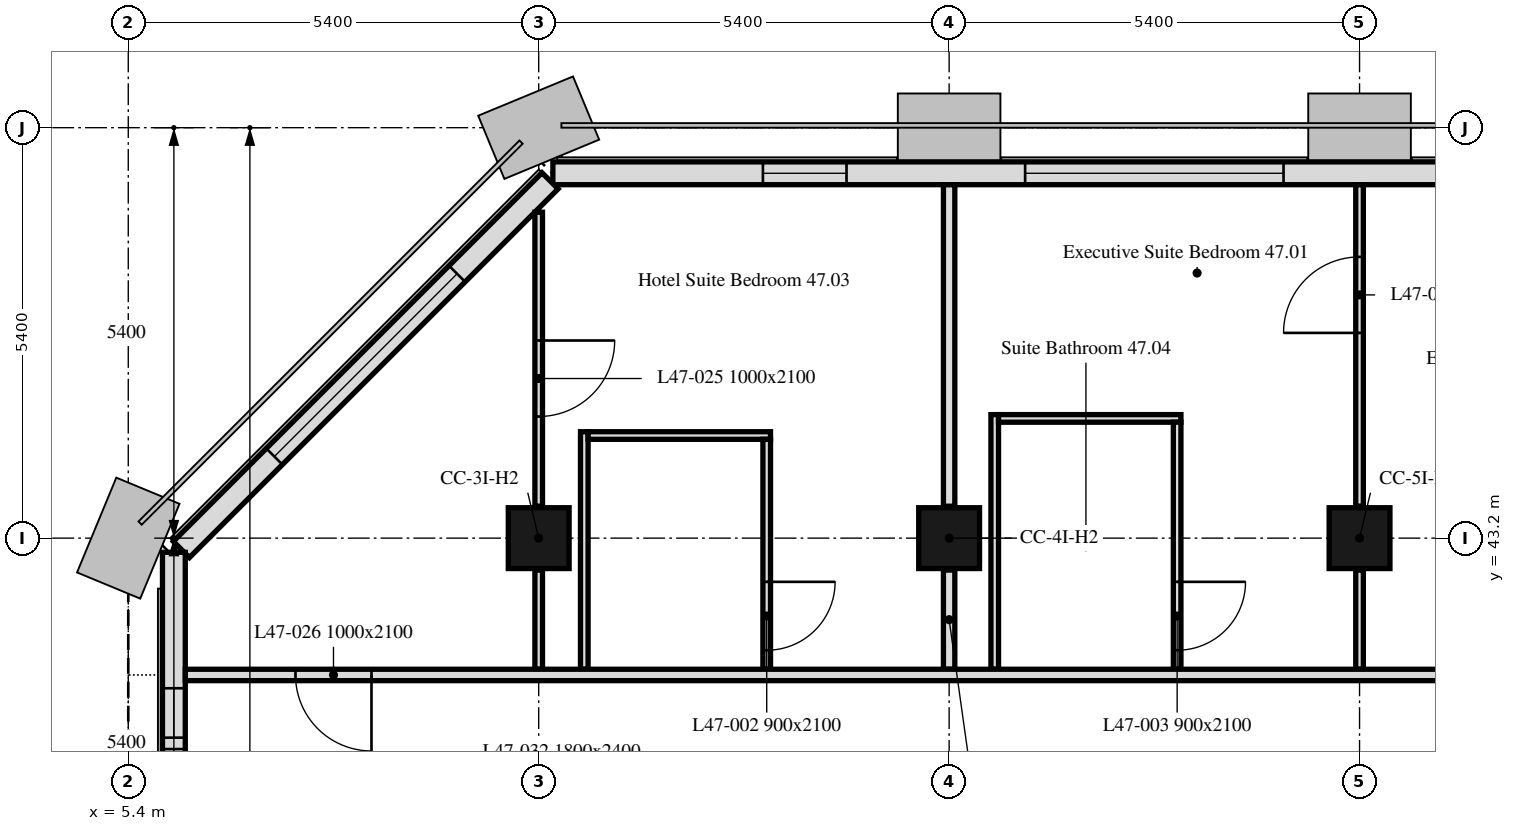
"""IFC4 building model, lengths in metres.
Left out: names, types, materials, properties, quantities, classifications, styles, units other than length and angle.
Written with IfcOpenShell. Run it as: python <this file> out.ifc"""

import sys

from ifc_helpers import new_model, si_unit, direction, frame, frame_2d, origin, origin_2d, place, context, subcontext, project, spatial, rectangle, extrude, element, fill, save


model = new_model("IFC4")
c1 = context("Model", 3, precision=1e-05, world=origin(), true_north=direction((0.0, 1.0)))
c2 = subcontext(c1, "Body", "Model", "MODEL_VIEW")
j1 = project(units=[si_unit("LENGTHUNIT", "METRE"), si_unit("PLANEANGLEUNIT", "RADIAN")], contexts=[c1])
p1 = place(None, origin())
s1 = spatial("IfcSite", under=j1, at=p1, CompositionType="ELEMENT")
p2 = place(p1, origin())
s2 = spatial("IfcBuilding", under=s1, at=p2, CompositionType="ELEMENT")
p3 = place(p2, frame((0.0, 0.0, 193.9)))
s3 = spatial("IfcBuildingStorey", under=s2, at=p3, CompositionType="ELEMENT", Elevation=193.9)
for number, where, z_axis, x_axis in (
    (1, (10.8, 43.2, 0.0), (0.0, 0.0, 1.0), (1.0, 0.0, 0.0)),
    (2, (16.2, 43.2, 0.0), (0.0, 0.0, 1.0), (1.0, 0.0, 0.0)),
    (3, (21.6, 43.2, 0.0), (0.0, 0.0, 1.0), (1.0, 0.0, 0.0)),
):
    element("IfcColumn", number, at=place(p3, frame(where, z_axis=z_axis, x_axis=x_axis)), inside=s3, PredefinedType="COLUMN", context=c2, shape_type="SweptSolid", body=[
        extrude(rectangle(XDim=0.8, YDim=0.8, at=origin_2d()), origin(), (0.0, 0.0, 1.0), 3.0),
    ])
p4 = place(p3, frame((43.014, 48.0, 0.0), z_axis=(0.0, 0.0, 1.0), x_axis=(-1.0, 0.0, 0.0)))
e4 = element("IfcWall", 4, at=p4, inside=s3, PredefinedType="SOLIDWALL", context=c2, shape_type="SweptSolid", body=[
    extrude(rectangle(XDim=32.027, YDim=0.3, at=frame_2d((16.014, 0.0))), origin(), (0.0, 0.0, 1.0), 3.0),
])
p5 = place(p4, frame((0.814, 0.0, 0.9)))
e5 = element("IfcOpeningElement", 5, at=p5, cuts=e4, PredefinedType="OPENING", context=c2, shape_type="SweptSolid", body=[
    extrude(rectangle(XDim=3.4, YDim=1.7, at=frame_2d((1.7, 0.85))), frame((0.0, 0.16, 0.0), z_axis=(0.0, -1.0, 0.0), x_axis=(1.0, 0.0, 0.0)), (0.0, 0.0, 1.0), 0.32),
])
p6 = place(p4, frame((6.564, 0.0, 0.9)))
e6 = element("IfcOpeningElement", 6, at=p6, cuts=e4, PredefinedType="OPENING", context=c2, shape_type="SweptSolid", body=[
    extrude(rectangle(XDim=1.1, YDim=1.7, at=frame_2d((0.55, 0.85))), frame((0.0, 0.16, 0.0), z_axis=(0.0, -1.0, 0.0), x_axis=(1.0, 0.0, 0.0)), (0.0, 0.0, 1.0), 0.32),
])
p7 = place(p4, frame((11.614, 0.0, 0.9)))
e7 = element("IfcOpeningElement", 7, at=p7, cuts=e4, PredefinedType="OPENING", context=c2, shape_type="SweptSolid", body=[
    extrude(rectangle(XDim=3.4, YDim=1.7, at=frame_2d((1.7, 0.85))), frame((0.0, 0.16, 0.0), z_axis=(0.0, -1.0, 0.0), x_axis=(1.0, 0.0, 0.0)), (0.0, 0.0, 1.0), 0.32),
])
p8 = place(p4, frame((17.364, 0.0, 0.9)))
e8 = element("IfcOpeningElement", 8, at=p8, cuts=e4, PredefinedType="OPENING", context=c2, shape_type="SweptSolid", body=[
    extrude(rectangle(XDim=1.1, YDim=1.7, at=frame_2d((0.55, 0.85))), frame((0.0, 0.16, 0.0), z_axis=(0.0, -1.0, 0.0), x_axis=(1.0, 0.0, 0.0)), (0.0, 0.0, 1.0), 0.32),
])
p9 = place(p4, frame((22.414, 0.0, 0.9)))
e9 = element("IfcOpeningElement", 9, at=p9, cuts=e4, PredefinedType="OPENING", context=c2, shape_type="SweptSolid", body=[
    extrude(rectangle(XDim=3.4, YDim=1.7, at=frame_2d((1.7, 0.85))), frame((0.0, 0.16, 0.0), z_axis=(0.0, -1.0, 0.0), x_axis=(1.0, 0.0, 0.0)), (0.0, 0.0, 1.0), 0.32),
])
p10 = place(p4, frame((28.164, 0.0, 0.9)))
e10 = element("IfcOpeningElement", 10, at=p10, cuts=e4, PredefinedType="OPENING", context=c2, shape_type="SweptSolid", body=[
    extrude(rectangle(XDim=1.1, YDim=1.7, at=frame_2d((0.55, 0.85))), frame((0.0, 0.16, 0.0), z_axis=(0.0, -1.0, 0.0), x_axis=(1.0, 0.0, 0.0)), (0.0, 0.0, 1.0), 0.32),
])
p11 = place(p3, frame((10.949, 47.901, 0.0), z_axis=(0.0, 0.0, 1.0), x_axis=(-0.707106781187, -0.707106781187, 0.0)))
e11 = element("IfcWall", 11, at=p11, inside=s3, PredefinedType="SOLIDWALL", context=c2, shape_type="SweptSolid", body=[
    extrude(rectangle(XDim=6.86, YDim=0.3, at=frame_2d((3.43, 0.0))), origin(), (0.0, 0.0, 1.0), 3.0),
])
p12 = place(p11, frame((1.73, 0.0, 0.9)))
e12 = element("IfcOpeningElement", 12, at=p12, cuts=e11, PredefinedType="OPENING", context=c2, shape_type="SweptSolid", body=[
    extrude(rectangle(XDim=3.4, YDim=1.7, at=frame_2d((1.7, 0.85))), frame((0.0, 0.16, 0.0), z_axis=(0.0, -1.0, 0.0), x_axis=(1.0, 0.0, 0.0)), (0.0, 0.0, 1.0), 0.32),
])
p13 = place(p3, frame((6.0, 43.014, 0.0), z_axis=(0.0, 0.0, 1.0), x_axis=(0.0, -1.0, 0.0)))
e13 = element("IfcWall", 13, at=p13, inside=s3, PredefinedType="SOLIDWALL", context=c2, shape_type="SweptSolid", body=[
    extrude(rectangle(XDim=10.614, YDim=0.3, at=frame_2d((5.307, 0.0))), origin(), (0.0, 0.0, 1.0), 3.0),
])
p14 = place(p13, frame((1.789, 0.0, 0.9)))
e14 = element("IfcOpeningElement", 14, at=p14, cuts=e13, PredefinedType="OPENING", context=c2, shape_type="SweptSolid", body=[
    extrude(rectangle(XDim=0.65, YDim=1.7, at=frame_2d((0.325, 0.85))), frame((0.0, 0.16, 0.0), z_axis=(0.0, -1.0, 0.0), x_axis=(1.0, 0.0, 0.0)), (0.0, 0.0, 1.0), 0.32),
])
p15 = place(p13, frame((2.589, 0.0, 0.9)))
e15 = element("IfcOpeningElement", 15, at=p15, cuts=e13, PredefinedType="OPENING", context=c2, shape_type="SweptSolid", body=[
    extrude(rectangle(XDim=0.65, YDim=1.7, at=frame_2d((0.325, 0.85))), frame((0.0, 0.16, 0.0), z_axis=(0.0, -1.0, 0.0), x_axis=(1.0, 0.0, 0.0)), (0.0, 0.0, 1.0), 0.32),
])
p16 = place(p13, frame((6.564, 0.0, 0.9)))
e16 = element("IfcOpeningElement", 16, at=p16, cuts=e13, PredefinedType="OPENING", context=c2, shape_type="SweptSolid", body=[
    extrude(rectangle(XDim=1.1, YDim=1.7, at=frame_2d((0.55, 0.85))), frame((0.0, 0.16, 0.0), z_axis=(0.0, -1.0, 0.0), x_axis=(1.0, 0.0, 0.0)), (0.0, 0.0, 1.0), 0.32),
])
p17 = place(p13, frame((8.164, 0.0, 0.9)))
e17 = element("IfcOpeningElement", 17, at=p17, cuts=e13, PredefinedType="OPENING", context=c2, shape_type="SweptSolid", body=[
    extrude(rectangle(XDim=1.1, YDim=1.7, at=frame_2d((0.55, 0.85))), frame((0.0, 0.16, 0.0), z_axis=(0.0, -1.0, 0.0), x_axis=(1.0, 0.0, 0.0)), (0.0, 0.0, 1.0), 0.32),
])
p18 = place(p3, frame((10.8, 47.488, 0.0), z_axis=(0.0, 0.0, 1.0), x_axis=(0.0, -1.0, 0.0)))
e18 = element("IfcWall", 18, at=p18, inside=s3, PredefinedType="PARTITIONING", context=c2, shape_type="SweptSolid", body=[
    extrude(rectangle(XDim=3.868, YDim=0.1, at=frame_2d((1.934, 0.0))), origin(), (0.0, 0.0, 1.0), 3.0),
])
p19 = place(p18, frame((1.688, 0.0, 0.0)))
e19 = element("IfcOpeningElement", 19, at=p19, cuts=e18, PredefinedType="OPENING", context=c2, shape_type="SweptSolid", body=[
    extrude(rectangle(XDim=1.0, YDim=2.1, at=frame_2d((0.5, 1.05))), frame((0.0, 0.05, 0.0), z_axis=(0.0, -1.0, 0.0), x_axis=(1.0, 0.0, 0.0)), (0.0, 0.0, 1.0), 0.1),
])
p20 = place(p3, frame((10.8, 42.78, 0.0), z_axis=(0.0, 0.0, 1.0), x_axis=(0.0, -1.0, 0.0)))
e20 = element("IfcWall", 20, at=p20, inside=s3, PredefinedType="PARTITIONING", context=c2, shape_type="SweptSolid", body=[
    extrude(rectangle(XDim=1.305, YDim=0.1, at=frame_2d((0.652, 0.0))), origin(), (0.0, 0.0, 1.0), 3.0),
])
p21 = place(p3, frame((11.4, 41.475, 0.0), z_axis=(0.0, 0.0, 1.0), x_axis=(0.0, 1.0, 0.0)))
e21 = element("IfcWall", 21, at=p21, inside=s3, PredefinedType="PARTITIONING", context=c2, shape_type="SweptSolid", body=[
    extrude(rectangle(XDim=3.125, YDim=0.1, at=frame_2d((1.562, 0.0))), origin(), (0.0, 0.0, 1.0), 3.0),
])
p22 = place(p3, frame((11.45, 44.55, 0.0), z_axis=(0.0, 0.0, 1.0), x_axis=(1.0, 0.0, 0.0)))
e22 = element("IfcWall", 22, at=p22, inside=s3, PredefinedType="PARTITIONING", context=c2, shape_type="SweptSolid", body=[
    extrude(rectangle(XDim=2.4, YDim=0.1, at=frame_2d((1.2, 0.0))), origin(), (0.0, 0.0, 1.0), 3.0),
])
p23 = place(p3, frame((13.8, 44.5, 0.0), z_axis=(0.0, 0.0, 1.0), x_axis=(0.0, -1.0, 0.0)))
e23 = element("IfcWall", 23, at=p23, inside=s3, PredefinedType="PARTITIONING", context=c2, shape_type="SweptSolid", body=[
    extrude(rectangle(XDim=3.025, YDim=0.1, at=frame_2d((1.512, 0.0))), origin(), (0.0, 0.0, 1.0), 3.0),
])
p24 = place(p23, frame((1.875, 0.0, 0.0)))
e24 = element("IfcOpeningElement", 24, at=p24, cuts=e23, PredefinedType="OPENING", context=c2, shape_type="SweptSolid", body=[
    extrude(rectangle(XDim=0.9, YDim=2.1, at=frame_2d((0.45, 1.05))), frame((0.0, 0.05, 0.0), z_axis=(0.0, -1.0, 0.0), x_axis=(1.0, 0.0, 0.0)), (0.0, 0.0, 1.0), 0.1),
])
p25 = place(p3, frame((16.2, 41.475, 0.0), z_axis=(0.0, 0.0, 1.0), x_axis=(0.0, 1.0, 0.0)))
e25 = element("IfcWall", 25, at=p25, inside=s3, PredefinedType="PARTITIONING", context=c2, shape_type="SweptSolid", body=[
    extrude(rectangle(XDim=1.305, YDim=0.15, at=frame_2d((0.652, 0.0))), origin(), (0.0, 0.0, 1.0), 2.4),
])
p26 = place(p3, frame((16.2, 43.62, 0.0), z_axis=(0.0, 0.0, 1.0), x_axis=(0.0, 1.0, 0.0)))
e26 = element("IfcWall", 26, at=p26, inside=s3, PredefinedType="PARTITIONING", context=c2, shape_type="SweptSolid", body=[
    extrude(rectangle(XDim=4.229, YDim=0.15, at=frame_2d((2.115, 0.0))), origin(), (0.0, 0.0, 1.0), 2.4),
])
p27 = place(p3, frame((16.8, 41.475, 0.0), z_axis=(0.0, 0.0, 1.0), x_axis=(0.0, 1.0, 0.0)))
e27 = element("IfcWall", 27, at=p27, inside=s3, PredefinedType="PARTITIONING", context=c2, shape_type="SweptSolid", body=[
    extrude(rectangle(XDim=3.35, YDim=0.1, at=frame_2d((1.675, 0.0))), origin(), (0.0, 0.0, 1.0), 3.0),
])
p28 = place(p3, frame((16.85, 44.775, 0.0), z_axis=(0.0, 0.0, 1.0), x_axis=(1.0, 0.0, 0.0)))
e28 = element("IfcWall", 28, at=p28, inside=s3, PredefinedType="PARTITIONING", context=c2, shape_type="SweptSolid", body=[
    extrude(rectangle(XDim=2.4, YDim=0.1, at=frame_2d((1.2, 0.0))), origin(), (0.0, 0.0, 1.0), 3.0),
])
p29 = place(p3, frame((19.2, 44.725, 0.0), z_axis=(0.0, 0.0, 1.0), x_axis=(0.0, -1.0, 0.0)))
e29 = element("IfcWall", 29, at=p29, inside=s3, PredefinedType="PARTITIONING", context=c2, shape_type="SweptSolid", body=[
    extrude(rectangle(XDim=3.25, YDim=0.1, at=frame_2d((1.625, 0.0))), origin(), (0.0, 0.0, 1.0), 3.0),
])
p30 = place(p29, frame((2.1, 0.0, 0.0)))
e30 = element("IfcOpeningElement", 30, at=p30, cuts=e29, PredefinedType="OPENING", context=c2, shape_type="SweptSolid", body=[
    extrude(rectangle(XDim=0.9, YDim=2.1, at=frame_2d((0.45, 1.05))), frame((0.0, 0.05, 0.0), z_axis=(0.0, -1.0, 0.0), x_axis=(1.0, 0.0, 0.0)), (0.0, 0.0, 1.0), 0.1),
])
p31 = place(p3, frame((21.6, 41.475, 0.0), z_axis=(0.0, 0.0, 1.0), x_axis=(0.0, 1.0, 0.0)))
e31 = element("IfcWall", 31, at=p31, inside=s3, PredefinedType="PARTITIONING", context=c2, shape_type="SweptSolid", body=[
    extrude(rectangle(XDim=1.305, YDim=0.1, at=frame_2d((0.652, 0.0))), origin(), (0.0, 0.0, 1.0), 2.4),
])
p32 = place(p3, frame((21.6, 43.62, 0.0), z_axis=(0.0, 0.0, 1.0), x_axis=(0.0, 1.0, 0.0)))
e32 = element("IfcWall", 32, at=p32, inside=s3, PredefinedType="PARTITIONING", context=c2, shape_type="SweptSolid", body=[
    extrude(rectangle(XDim=4.229, YDim=0.1, at=frame_2d((2.115, 0.0))), origin(), (0.0, 0.0, 1.0), 2.4),
])
p33 = place(p32, frame((2.28, 0.0, 0.0)))
e33 = element("IfcOpeningElement", 33, at=p33, cuts=e32, PredefinedType="OPENING", context=c2, shape_type="SweptSolid", body=[
    extrude(rectangle(XDim=1.0, YDim=2.1, at=frame_2d((0.5, 1.05))), frame((0.0, 0.05, 0.0), z_axis=(0.0, -1.0, 0.0), x_axis=(1.0, 0.0, 0.0)), (0.0, 0.0, 1.0), 0.1),
])
p34 = place(p3, frame((47.849, 41.4, 0.0), z_axis=(0.0, 0.0, 1.0), x_axis=(-1.0, 0.0, 0.0)))
e34 = element("IfcWall", 34, at=p34, inside=s3, PredefinedType="PARTITIONING", context=c2, shape_type="SweptSolid", body=[
    extrude(rectangle(XDim=41.698, YDim=0.15, at=frame_2d((20.849, 0.0))), origin(), (0.0, 0.0, 1.0), 2.4),
])
p35 = place(p34, frame((39.249, 0.0, 0.0)))
e35 = element("IfcOpeningElement", 35, at=p35, cuts=e34, PredefinedType="OPENING", context=c2, shape_type="SweptSolid", body=[
    extrude(rectangle(XDim=1.0, YDim=2.1, at=frame_2d((0.5, 1.05))), frame((0.0, 0.075, 0.0), z_axis=(0.0, -1.0, 0.0), x_axis=(1.0, 0.0, 0.0)), (0.0, 0.0, 1.0), 0.15),
])
p36 = place(p34, frame((11.449, 0.0, 0.0)))
e36 = element("IfcOpeningElement", 36, at=p36, cuts=e34, PredefinedType="OPENING", context=c2, shape_type="SweptSolid", body=[
    extrude(rectangle(XDim=1.0, YDim=2.1, at=frame_2d((0.5, 1.05))), frame((0.0, 0.075, 0.0), z_axis=(0.0, -1.0, 0.0), x_axis=(1.0, 0.0, 0.0)), (0.0, 0.0, 1.0), 0.15),
])
p37 = place(p34, frame((3.099, 0.0, 0.0)))
e37 = element("IfcOpeningElement", 37, at=p37, cuts=e34, PredefinedType="OPENING", context=c2, shape_type="SweptSolid", body=[
    extrude(rectangle(XDim=1.0, YDim=2.1, at=frame_2d((0.5, 1.05))), frame((0.0, 0.075, 0.0), z_axis=(0.0, -1.0, 0.0), x_axis=(1.0, 0.0, 0.0)), (0.0, 0.0, 1.0), 0.15),
])
p38 = place(p34, frame((23.049, 0.0, 0.0)))
e38 = element("IfcOpeningElement", 38, at=p38, cuts=e34, PredefinedType="OPENING", context=c2, shape_type="SweptSolid", body=[
    extrude(rectangle(XDim=1.0, YDim=2.1, at=frame_2d((0.5, 1.05))), frame((0.0, 0.075, 0.0), z_axis=(0.0, -1.0, 0.0), x_axis=(1.0, 0.0, 0.0)), (0.0, 0.0, 1.0), 0.15),
])
p39 = place(p9, origin())
e39 = element("IfcWindow", 39, at=p39, inside=s3, PartitioningType="SINGLE_PANEL", PredefinedType="WINDOW", context=c2, shape_type="SweptSolid", body=[
    extrude(rectangle(XDim=3.4, YDim=1.7, at=frame_2d((1.7, 0.85))), frame((0.0, 0.03, 0.0), z_axis=(0.0, -1.0, 0.0), x_axis=(1.0, 0.0, 0.0)), (0.0, 0.0, 1.0), 0.06),
])
fill(e9, e39)
p40 = place(p10, origin())
e40 = element("IfcWindow", 40, at=p40, inside=s3, PartitioningType="SINGLE_PANEL", PredefinedType="WINDOW", context=c2, shape_type="SweptSolid", body=[
    extrude(rectangle(XDim=1.1, YDim=1.7, at=frame_2d((0.55, 0.85))), frame((0.0, 0.03, 0.0), z_axis=(0.0, -1.0, 0.0), x_axis=(1.0, 0.0, 0.0)), (0.0, 0.0, 1.0), 0.06),
])
fill(e10, e40)
p41 = place(p12, origin())
e41 = element("IfcWindow", 41, at=p41, inside=s3, PartitioningType="SINGLE_PANEL", PredefinedType="WINDOW", context=c2, shape_type="SweptSolid", body=[
    extrude(rectangle(XDim=3.4, YDim=1.7, at=frame_2d((1.7, 0.85))), frame((0.0, 0.03, 0.0), z_axis=(0.0, -1.0, 0.0), x_axis=(1.0, 0.0, 0.0)), (0.0, 0.0, 1.0), 0.06),
])
fill(e12, e41)
p42 = place(p14, origin())
e42 = element("IfcWindow", 42, at=p42, inside=s3, PartitioningType="SINGLE_PANEL", PredefinedType="WINDOW", context=c2, shape_type="SweptSolid", body=[
    extrude(rectangle(XDim=0.65, YDim=1.7, at=frame_2d((0.325, 0.85))), frame((0.0, 0.03, 0.0), z_axis=(0.0, -1.0, 0.0), x_axis=(1.0, 0.0, 0.0)), (0.0, 0.0, 1.0), 0.06),
])
fill(e14, e42)
p43 = place(p15, origin())
e43 = element("IfcWindow", 43, at=p43, inside=s3, PartitioningType="SINGLE_PANEL", PredefinedType="WINDOW", context=c2, shape_type="SweptSolid", body=[
    extrude(rectangle(XDim=0.65, YDim=1.7, at=frame_2d((0.325, 0.85))), frame((0.0, 0.03, 0.0), z_axis=(0.0, -1.0, 0.0), x_axis=(1.0, 0.0, 0.0)), (0.0, 0.0, 1.0), 0.06),
])
fill(e15, e43)
p44 = place(p24, origin())
e44 = element("IfcDoor", 44, at=p44, inside=s3, OperationType="SINGLE_SWING_RIGHT", PredefinedType="DOOR", context=c2, shape_type="SweptSolid", body=[
    extrude(rectangle(XDim=0.9, YDim=2.1, at=frame_2d((0.45, 1.05))), frame((0.0, 0.025, 0.0), z_axis=(0.0, -1.0, 0.0), x_axis=(1.0, 0.0, 0.0)), (0.0, 0.0, 1.0), 0.05),
])
fill(e24, e44)
p45 = place(p30, origin())
e45 = element("IfcDoor", 45, at=p45, inside=s3, OperationType="SINGLE_SWING_RIGHT", PredefinedType="DOOR", context=c2, shape_type="SweptSolid", body=[
    extrude(rectangle(XDim=0.9, YDim=2.1, at=frame_2d((0.45, 1.05))), frame((0.0, 0.025, 0.0), z_axis=(0.0, -1.0, 0.0), x_axis=(1.0, 0.0, 0.0)), (0.0, 0.0, 1.0), 0.05),
])
fill(e30, e45)
p46 = place(p19, origin())
e46 = element("IfcDoor", 46, at=p46, inside=s3, OperationType="SINGLE_SWING_RIGHT", PredefinedType="DOOR", context=c2, shape_type="SweptSolid", body=[
    extrude(rectangle(XDim=1.0, YDim=2.1, at=frame_2d((0.5, 1.05))), frame((0.0, 0.025, 0.0), z_axis=(0.0, -1.0, 0.0), x_axis=(1.0, 0.0, 0.0)), (0.0, 0.0, 1.0), 0.05),
])
fill(e19, e46)
p47 = place(p35, origin())
e47 = element("IfcDoor", 47, at=p47, inside=s3, OperationType="SINGLE_SWING_LEFT", PredefinedType="DOOR", context=c2, shape_type="SweptSolid", body=[
    extrude(rectangle(XDim=1.0, YDim=2.1, at=frame_2d((0.5, 1.05))), frame((0.0, 0.025, 0.0), z_axis=(0.0, -1.0, 0.0), x_axis=(1.0, 0.0, 0.0)), (0.0, 0.0, 1.0), 0.05),
])
fill(e35, e47)
p48 = place(p33, origin())
e48 = element("IfcDoor", 48, at=p48, inside=s3, OperationType="SINGLE_SWING_RIGHT", PredefinedType="DOOR", context=c2, shape_type="SweptSolid", body=[
    extrude(rectangle(XDim=1.0, YDim=2.1, at=frame_2d((0.5, 1.05))), frame((0.0, 0.025, 0.0), z_axis=(0.0, -1.0, 0.0), x_axis=(1.0, 0.0, 0.0)), (0.0, 0.0, 1.0), 0.05),
])
fill(e33, e48)
save(model, sys.argv[1])
